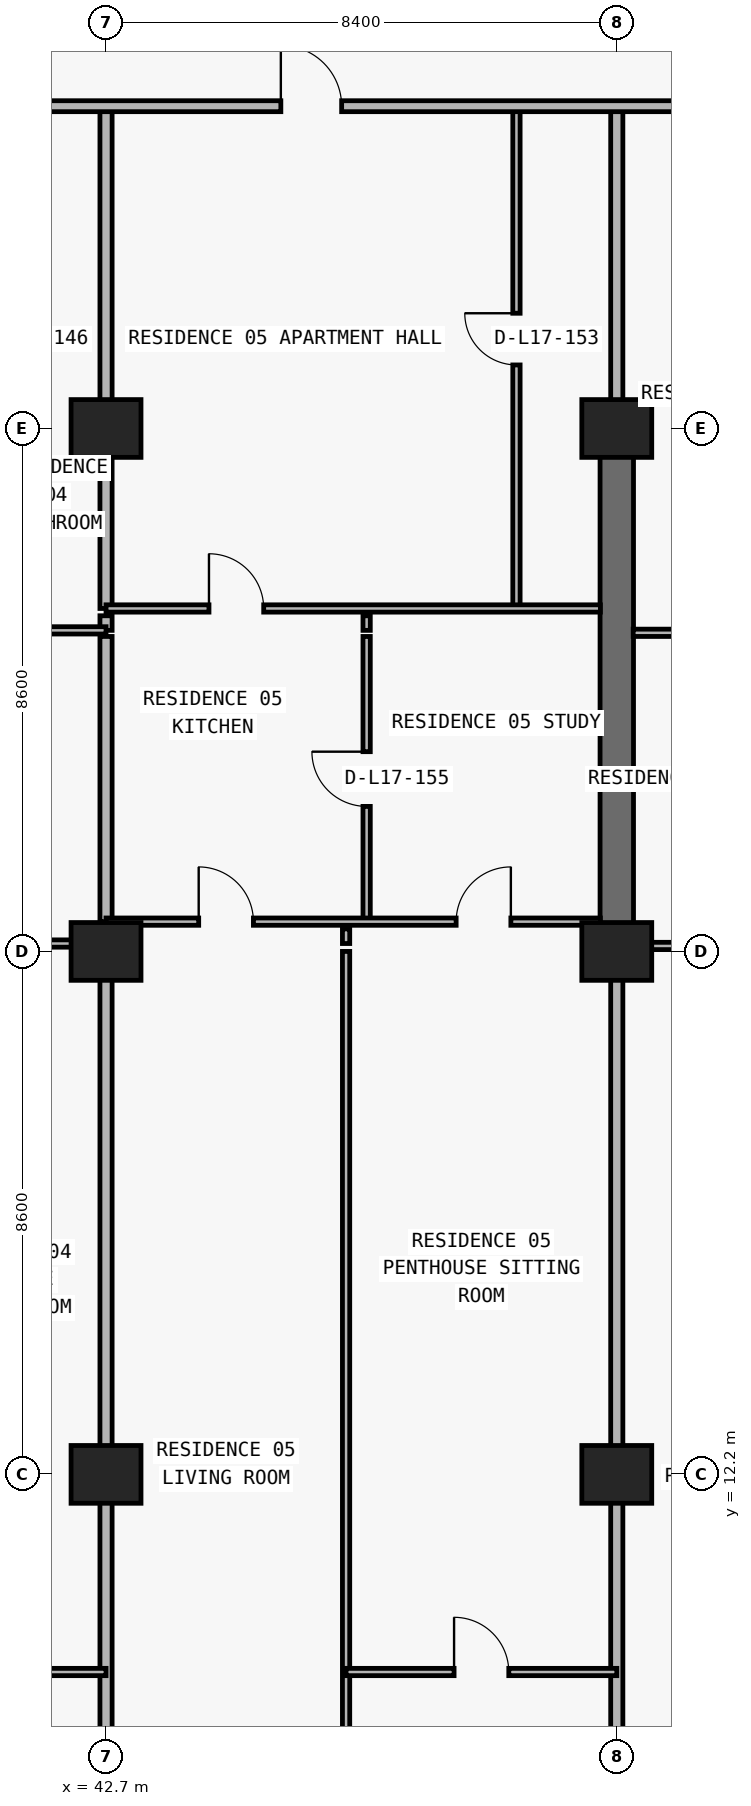
"""IFC4 building model, lengths in metres.
Left out: names, types, materials, properties, quantities, classifications, styles, units other than length and angle.
Written with IfcOpenShell. Run it as: python <this file> out.ifc"""

import sys

from ifc_helpers import new_model, si_unit, direction, frame, frame_2d, origin, origin_2d, place, context, subcontext, project, spatial, rectangle, extrude, element, fill, save


model = new_model("IFC4")
c1 = context("Model", 3, precision=1e-05, world=origin(), true_north=direction((0.0, 1.0)))
c2 = subcontext(c1, "Body", "Model", "MODEL_VIEW")
j1 = project(units=[si_unit("LENGTHUNIT", "METRE"), si_unit("PLANEANGLEUNIT", "RADIAN")], contexts=[c1])
p1 = place(None, origin())
s1 = spatial("IfcSite", under=j1, at=p1, CompositionType="ELEMENT")
p2 = place(p1, origin())
s2 = spatial("IfcBuilding", under=s1, at=p2, CompositionType="ELEMENT")
p3 = place(p2, frame((0.0, 0.0, 66.3)))
s3 = spatial("IfcBuildingStorey", under=s2, at=p3, CompositionType="ELEMENT", Elevation=66.3)
for number, where, z_axis, x_axis in (
    (1, (42.7, 12.2, 0.0), (0.0, 0.0, 1.0), (1.0, 0.0, 0.0)),
    (2, (51.1, 12.2, 0.0), (0.0, 0.0, 1.0), (1.0, 0.0, 0.0)),
    (3, (42.7, 20.8, 0.0), (0.0, 0.0, 1.0), (1.0, 0.0, 0.0)),
    (4, (51.1, 20.8, 0.0), (0.0, 0.0, 1.0), (1.0, 0.0, 0.0)),
    (5, (42.7, 29.4, 0.0), (0.0, 0.0, 1.0), (1.0, 0.0, 0.0)),
    (6, (51.1, 29.4, 0.0), (0.0, 0.0, 1.0), (1.0, 0.0, 0.0)),
):
    element("IfcColumn", number, at=place(p3, frame(where, z_axis=z_axis, x_axis=x_axis)), inside=s3, PredefinedType="COLUMN", context=c2, shape_type="SweptSolid", body=[
        extrude(rectangle(XDim=1.15, YDim=0.95, at=origin_2d()), origin(), (0.0, 0.0, 1.0), 3.05),
    ])
p4 = place(p3, frame((51.1, 20.8, 0.0), z_axis=(0.0, 0.0, 1.0), x_axis=(0.0, 1.0, 0.0)))
e7 = element("IfcWall", 7, at=p4, inside=s3, PredefinedType="SHEAR", context=c2, shape_type="SweptSolid", body=[
    extrude(rectangle(XDim=8.6, YDim=0.55, at=frame_2d((4.3, 0.0))), origin(), (0.0, 0.0, 1.0), 3.05),
])
p5 = place(p3, frame((42.7, 6.24, 0.0), z_axis=(0.0, 0.0, 1.0), x_axis=(0.0, 1.0, 0.0)))
e8 = element("IfcWall", 8, at=p5, inside=s3, PredefinedType="PARTITIONING", context=c2, shape_type="SweptSolid", body=[
    extrude(rectangle(XDim=14.56, YDim=0.2, at=frame_2d((7.28, 0.0))), origin(), (0.0, 0.0, 1.0), 2.11),
])
p6 = place(p3, frame((42.7, 20.93, 0.0), z_axis=(0.0, 0.0, 1.0), x_axis=(0.0, 1.0, 0.0)))
e9 = element("IfcWall", 9, at=p6, inside=s3, PredefinedType="PARTITIONING", context=c2, shape_type="SweptSolid", body=[
    extrude(rectangle(XDim=0.24, YDim=0.2, at=frame_2d((0.12, 0.0))), origin(), (0.0, 0.0, 1.0), 3.05),
])
p7 = place(p3, frame((42.7, 21.29, 0.0), z_axis=(0.0, 0.0, 1.0), x_axis=(0.0, 1.0, 0.0)))
e10 = element("IfcWall", 10, at=p7, inside=s3, PredefinedType="PARTITIONING", context=c2, shape_type="SweptSolid", body=[
    extrude(rectangle(XDim=4.69, YDim=0.2, at=frame_2d((2.345, 0.0))), origin(), (0.0, 0.0, 1.0), 2.11),
])
p8 = place(p3, frame((42.7, 26.08, 0.0), z_axis=(0.0, 0.0, 1.0), x_axis=(0.0, 1.0, 0.0)))
e11 = element("IfcWall", 11, at=p8, inside=s3, PredefinedType="PARTITIONING", context=c2, shape_type="SweptSolid", body=[
    extrude(rectangle(XDim=0.24, YDim=0.2, at=frame_2d((0.12, 0.0))), origin(), (0.0, 0.0, 1.0), 2.11),
])
p9 = place(p3, frame((42.7, 26.44, 0.0), z_axis=(0.0, 0.0, 1.0), x_axis=(0.0, 1.0, 0.0)))
e12 = element("IfcWall", 12, at=p9, inside=s3, PredefinedType="PARTITIONING", context=c2, shape_type="SweptSolid", body=[
    extrude(rectangle(XDim=8.26, YDim=0.2, at=frame_2d((4.13, 0.0))), origin(), (0.0, 0.0, 1.0), 2.11),
])
p10 = place(p3, frame((46.648, 6.24, 0.0), z_axis=(0.0, 0.0, 1.0), x_axis=(0.0, 1.0, 0.0)))
e13 = element("IfcWall", 13, at=p10, inside=s3, PredefinedType="PARTITIONING", context=c2, shape_type="SweptSolid", body=[
    extrude(rectangle(XDim=14.56, YDim=0.12, at=frame_2d((7.28, 0.0))), origin(), (0.0, 0.0, 1.0), 2.423),
])
p11 = place(p3, frame((46.648, 20.93, 0.0), z_axis=(0.0, 0.0, 1.0), x_axis=(0.0, 1.0, 0.0)))
e14 = element("IfcWall", 14, at=p11, inside=s3, PredefinedType="PARTITIONING", context=c2, shape_type="SweptSolid", body=[
    extrude(rectangle(XDim=0.24, YDim=0.12, at=frame_2d((0.12, 0.0))), origin(), (0.0, 0.0, 1.0), 2.423),
])
p12 = place(p3, frame((46.986, 21.29, 0.0), z_axis=(0.0, 0.0, 1.0), x_axis=(0.0, 1.0, 0.0)))
e15 = element("IfcWall", 15, at=p12, inside=s3, PredefinedType="PARTITIONING", context=c2, shape_type="SweptSolid", body=[
    extrude(rectangle(XDim=4.69, YDim=0.12, at=frame_2d((2.345, 0.0))), origin(), (0.0, 0.0, 1.0), 2.423),
])
p13 = place(p12, frame((1.895, 0.0, 0.0)))
e16 = element("IfcOpeningElement", 16, at=p13, cuts=e15, PredefinedType="OPENING", context=c2, shape_type="SweptSolid", body=[
    extrude(rectangle(XDim=0.9, YDim=2.15, at=frame_2d((0.45, 1.075))), frame((0.0, 0.07, 0.0), z_axis=(0.0, -1.0, 0.0), x_axis=(1.0, 0.0, 0.0)), (0.0, 0.0, 1.0), 0.14),
])
p14 = place(p3, frame((46.986, 26.08, 0.0), z_axis=(0.0, 0.0, 1.0), x_axis=(0.0, 1.0, 0.0)))
e17 = element("IfcWall", 17, at=p14, inside=s3, PredefinedType="PARTITIONING", context=c2, shape_type="SweptSolid", body=[
    extrude(rectangle(XDim=0.24, YDim=0.12, at=frame_2d((0.12, 0.0))), origin(), (0.0, 0.0, 1.0), 2.423),
])
p15 = place(p3, frame((49.45, 26.44, 0.0), z_axis=(0.0, 0.0, 1.0), x_axis=(0.0, 1.0, 0.0)))
e18 = element("IfcWall", 18, at=p15, inside=s3, PredefinedType="PARTITIONING", context=c2, shape_type="SweptSolid", body=[
    extrude(rectangle(XDim=8.26, YDim=0.12, at=frame_2d((4.13, 0.0))), origin(), (0.0, 0.0, 1.0), 3.05),
])
p16 = place(p15, frame((4.005, 0.0, 0.0)))
e19 = element("IfcOpeningElement", 19, at=p16, cuts=e18, PredefinedType="OPENING", context=c2, shape_type="SweptSolid", body=[
    extrude(rectangle(XDim=0.85, YDim=2.1, at=frame_2d((0.425, 1.05))), frame((0.0, 0.07, 0.0), z_axis=(0.0, -1.0, 0.0), x_axis=(1.0, 0.0, 0.0)), (0.0, 0.0, 1.0), 0.14),
])
p17 = place(p3, frame((51.1, 6.24, 0.0), z_axis=(0.0, 0.0, 1.0), x_axis=(0.0, 1.0, 0.0)))
e20 = element("IfcWall", 20, at=p17, inside=s3, PredefinedType="PARTITIONING", context=c2, shape_type="SweptSolid", body=[
    extrude(rectangle(XDim=14.555, YDim=0.2, at=frame_2d((7.277, 0.0))), origin(), (0.0, 0.0, 1.0), 2.11),
])
p18 = place(p3, frame((51.1, 29.405, 0.0), z_axis=(0.0, 0.0, 1.0), x_axis=(0.0, 1.0, 0.0)))
e21 = element("IfcWall", 21, at=p18, inside=s3, PredefinedType="PARTITIONING", context=c2, shape_type="SweptSolid", body=[
    extrude(rectangle(XDim=5.295, YDim=0.2, at=frame_2d((2.647, 0.0))), origin(), (0.0, 0.0, 1.0), 2.335),
])
p19 = place(p3, frame((39.28, 8.95, 0.0), z_axis=(0.0, 0.0, 1.0), x_axis=(1.0, 0.0, 0.0)))
e22 = element("IfcWall", 22, at=p19, inside=s3, PredefinedType="PARTITIONING", context=c2, shape_type="SweptSolid", body=[
    extrude(rectangle(XDim=3.42, YDim=0.12, at=frame_2d((1.71, 0.0))), origin(), (0.0, 0.0, 1.0), 3.05),
])
p20 = place(p19, frame((1.26, 0.0, 0.0)))
e23 = element("IfcOpeningElement", 23, at=p20, cuts=e22, PredefinedType="OPENING", context=c2, shape_type="SweptSolid", body=[
    extrude(rectangle(XDim=0.9, YDim=2.15, at=frame_2d((0.45, 1.075))), frame((0.0, 0.07, 0.0), z_axis=(0.0, -1.0, 0.0), x_axis=(1.0, 0.0, 0.0)), (0.0, 0.0, 1.0), 0.14),
])
p21 = place(p3, frame((46.648, 8.95, 0.0), z_axis=(0.0, 0.0, 1.0), x_axis=(1.0, 0.0, 0.0)))
e24 = element("IfcWall", 24, at=p21, inside=s3, PredefinedType="PARTITIONING", context=c2, shape_type="SweptSolid", body=[
    extrude(rectangle(XDim=4.452, YDim=0.12, at=frame_2d((2.226, 0.0))), origin(), (0.0, 0.0, 1.0), 3.05),
])
p22 = place(p21, frame((1.776, 0.0, 0.0)))
e25 = element("IfcOpeningElement", 25, at=p22, cuts=e24, PredefinedType="OPENING", context=c2, shape_type="SweptSolid", body=[
    extrude(rectangle(XDim=0.9, YDim=2.15, at=frame_2d((0.45, 1.075))), frame((0.0, 0.07, 0.0), z_axis=(0.0, -1.0, 0.0), x_axis=(1.0, 0.0, 0.0)), (0.0, 0.0, 1.0), 0.14),
])
p23 = place(p3, frame((51.37, 20.89, 0.0), z_axis=(0.0, 0.0, 1.0), x_axis=(1.0, 0.0, 0.0)))
e26 = element("IfcWall", 26, at=p23, inside=s3, PredefinedType="PARTITIONING", context=c2, shape_type="SweptSolid", body=[
    extrude(rectangle(XDim=8.13, YDim=0.12, at=frame_2d((4.065, 0.0))), origin(), (0.0, 0.0, 1.0), 2.11),
])
p24 = place(p23, frame((1.683, 0.0, 0.0)))
e27 = element("IfcOpeningElement", 27, at=p24, cuts=e26, PredefinedType="OPENING", context=c2, shape_type="SweptSolid", body=[
    extrude(rectangle(XDim=0.9, YDim=2.06, at=frame_2d((0.45, 1.03))), frame((0.0, 0.07, 0.0), z_axis=(0.0, -1.0, 0.0), x_axis=(1.0, 0.0, 0.0)), (0.0, 0.0, 1.0), 0.14),
])
p25 = place(p23, frame((5.79, 0.0, 0.0)))
e28 = element("IfcOpeningElement", 28, at=p25, cuts=e26, PredefinedType="OPENING", context=c2, shape_type="SweptSolid", body=[
    extrude(rectangle(XDim=0.9, YDim=2.06, at=frame_2d((0.45, 1.03))), frame((0.0, 0.07, 0.0), z_axis=(0.0, -1.0, 0.0), x_axis=(1.0, 0.0, 0.0)), (0.0, 0.0, 1.0), 0.14),
])
p26 = place(p3, frame((35.1, 20.93, 0.0), z_axis=(0.0, 0.0, 1.0), x_axis=(1.0, 0.0, 0.0)))
e29 = element("IfcWall", 29, at=p26, inside=s3, PredefinedType="PARTITIONING", context=c2, shape_type="SweptSolid", body=[
    extrude(rectangle(XDim=7.6, YDim=0.12, at=frame_2d((3.8, 0.0))), origin(), (0.0, 0.0, 1.0), 2.11),
])
p27 = place(p26, frame((1.64, 0.0, 0.0)))
e30 = element("IfcOpeningElement", 30, at=p27, cuts=e29, PredefinedType="OPENING", context=c2, shape_type="SweptSolid", body=[
    extrude(rectangle(XDim=0.9, YDim=2.06, at=frame_2d((0.45, 1.03))), frame((0.0, 0.07, 0.0), z_axis=(0.0, -1.0, 0.0), x_axis=(1.0, 0.0, 0.0)), (0.0, 0.0, 1.0), 0.14),
])
p28 = place(p26, frame((5.527, 0.0, 0.0)))
e31 = element("IfcOpeningElement", 31, at=p28, cuts=e29, PredefinedType="OPENING", context=c2, shape_type="SweptSolid", body=[
    extrude(rectangle(XDim=0.9, YDim=2.06, at=frame_2d((0.45, 1.03))), frame((0.0, 0.07, 0.0), z_axis=(0.0, -1.0, 0.0), x_axis=(1.0, 0.0, 0.0)), (0.0, 0.0, 1.0), 0.14),
])
p29 = place(p3, frame((42.7, 21.29, 0.0), z_axis=(0.0, 0.0, 1.0), x_axis=(1.0, 0.0, 0.0)))
e32 = element("IfcWall", 32, at=p29, inside=s3, PredefinedType="PARTITIONING", context=c2, shape_type="SweptSolid", body=[
    extrude(rectangle(XDim=8.13, YDim=0.12, at=frame_2d((4.065, 0.0))), origin(), (0.0, 0.0, 1.0), 3.05),
])
p30 = place(p29, frame((1.524, 0.0, 0.0)))
e33 = element("IfcOpeningElement", 33, at=p30, cuts=e32, PredefinedType="OPENING", context=c2, shape_type="SweptSolid", body=[
    extrude(rectangle(XDim=0.9, YDim=2.15, at=frame_2d((0.45, 1.075))), frame((0.0, 0.07, 0.0), z_axis=(0.0, -1.0, 0.0), x_axis=(1.0, 0.0, 0.0)), (0.0, 0.0, 1.0), 0.14),
])
p31 = place(p29, frame((5.758, 0.0, 0.0)))
e34 = element("IfcOpeningElement", 34, at=p31, cuts=e32, PredefinedType="OPENING", context=c2, shape_type="SweptSolid", body=[
    extrude(rectangle(XDim=0.9, YDim=2.15, at=frame_2d((0.45, 1.075))), frame((0.0, 0.07, 0.0), z_axis=(0.0, -1.0, 0.0), x_axis=(1.0, 0.0, 0.0)), (0.0, 0.0, 1.0), 0.14),
])
p32 = place(p3, frame((51.37, 26.04, 0.0), z_axis=(0.0, 0.0, 1.0), x_axis=(1.0, 0.0, 0.0)))
e35 = element("IfcWall", 35, at=p32, inside=s3, PredefinedType="PARTITIONING", context=c2, shape_type="SweptSolid", body=[
    extrude(rectangle(XDim=8.13, YDim=0.12, at=frame_2d((4.065, 0.0))), origin(), (0.0, 0.0, 1.0), 3.05),
])
p33 = place(p32, frame((1.683, 0.0, 0.0)))
e36 = element("IfcOpeningElement", 36, at=p33, cuts=e35, PredefinedType="OPENING", context=c2, shape_type="SweptSolid", body=[
    extrude(rectangle(XDim=0.9, YDim=2.15, at=frame_2d((0.45, 1.075))), frame((0.0, 0.07, 0.0), z_axis=(0.0, -1.0, 0.0), x_axis=(1.0, 0.0, 0.0)), (0.0, 0.0, 1.0), 0.14),
])
p34 = place(p3, frame((35.1, 26.08, 0.0), z_axis=(0.0, 0.0, 1.0), x_axis=(1.0, 0.0, 0.0)))
e37 = element("IfcWall", 37, at=p34, inside=s3, PredefinedType="PARTITIONING", context=c2, shape_type="SweptSolid", body=[
    extrude(rectangle(XDim=7.6, YDim=0.12, at=frame_2d((3.8, 0.0))), origin(), (0.0, 0.0, 1.0), 3.05),
])
p35 = place(p34, frame((1.727, 0.0, 0.0)))
e38 = element("IfcOpeningElement", 38, at=p35, cuts=e37, PredefinedType="OPENING", context=c2, shape_type="SweptSolid", body=[
    extrude(rectangle(XDim=0.9, YDim=2.15, at=frame_2d((0.45, 1.075))), frame((0.0, 0.07, 0.0), z_axis=(0.0, -1.0, 0.0), x_axis=(1.0, 0.0, 0.0)), (0.0, 0.0, 1.0), 0.14),
])
p36 = place(p3, frame((42.7, 26.44, 0.0), z_axis=(0.0, 0.0, 1.0), x_axis=(1.0, 0.0, 0.0)))
e39 = element("IfcWall", 39, at=p36, inside=s3, PredefinedType="PARTITIONING", context=c2, shape_type="SweptSolid", body=[
    extrude(rectangle(XDim=8.13, YDim=0.12, at=frame_2d((4.065, 0.0))), origin(), (0.0, 0.0, 1.0), 3.05),
])
p37 = place(p36, frame((1.693, 0.0, 0.0)))
e40 = element("IfcOpeningElement", 40, at=p37, cuts=e39, PredefinedType="OPENING", context=c2, shape_type="SweptSolid", body=[
    extrude(rectangle(XDim=0.9, YDim=2.15, at=frame_2d((0.45, 1.075))), frame((0.0, 0.07, 0.0), z_axis=(0.0, -1.0, 0.0), x_axis=(1.0, 0.0, 0.0)), (0.0, 0.0, 1.0), 0.14),
])
p38 = place(p3, frame((26.7, 34.7, 0.0), z_axis=(0.0, 0.0, 1.0), x_axis=(1.0, 0.0, 0.0)))
e41 = element("IfcWall", 41, at=p38, inside=s3, PredefinedType="PARTITIONING", context=c2, shape_type="SweptSolid", body=[
    extrude(rectangle(XDim=46.0, YDim=0.18, at=frame_2d((23.0, 0.0))), origin(), (0.0, 0.0, 1.0), 3.05),
])
p39 = place(p38, frame((2.875, 0.0, 0.0)))
e42 = element("IfcOpeningElement", 42, at=p39, cuts=e41, PredefinedType="OPENING", context=c2, shape_type="SweptSolid", body=[
    extrude(rectangle(XDim=1.0, YDim=2.2, at=frame_2d((0.5, 1.1))), frame((0.0, 0.1, 0.0), z_axis=(0.0, -1.0, 0.0), x_axis=(1.0, 0.0, 0.0)), (0.0, 0.0, 1.0), 0.2),
])
p40 = place(p38, frame((10.875, 0.0, 0.0)))
e43 = element("IfcOpeningElement", 43, at=p40, cuts=e41, PredefinedType="OPENING", context=c2, shape_type="SweptSolid", body=[
    extrude(rectangle(XDim=1.0, YDim=2.2, at=frame_2d((0.5, 1.1))), frame((0.0, 0.1, 0.0), z_axis=(0.0, -1.0, 0.0), x_axis=(1.0, 0.0, 0.0)), (0.0, 0.0, 1.0), 0.2),
])
p41 = place(p38, frame((18.875, 0.0, 0.0)))
e44 = element("IfcOpeningElement", 44, at=p41, cuts=e41, PredefinedType="OPENING", context=c2, shape_type="SweptSolid", body=[
    extrude(rectangle(XDim=1.0, YDim=2.2, at=frame_2d((0.5, 1.1))), frame((0.0, 0.1, 0.0), z_axis=(0.0, -1.0, 0.0), x_axis=(1.0, 0.0, 0.0)), (0.0, 0.0, 1.0), 0.2),
])
p42 = place(p38, frame((27.275, 0.0, 0.0)))
e45 = element("IfcOpeningElement", 45, at=p42, cuts=e41, PredefinedType="OPENING", context=c2, shape_type="SweptSolid", body=[
    extrude(rectangle(XDim=1.0, YDim=2.2, at=frame_2d((0.5, 1.1))), frame((0.0, 0.1, 0.0), z_axis=(0.0, -1.0, 0.0), x_axis=(1.0, 0.0, 0.0)), (0.0, 0.0, 1.0), 0.2),
])
p43 = place(p38, frame((35.675, 0.0, 0.0)))
e46 = element("IfcOpeningElement", 46, at=p43, cuts=e41, PredefinedType="OPENING", context=c2, shape_type="SweptSolid", body=[
    extrude(rectangle(XDim=1.0, YDim=2.2, at=frame_2d((0.5, 1.1))), frame((0.0, 0.1, 0.0), z_axis=(0.0, -1.0, 0.0), x_axis=(1.0, 0.0, 0.0)), (0.0, 0.0, 1.0), 0.2),
])
p44 = place(p41, origin())
e47 = element("IfcDoor", 47, at=p44, inside=s3, OperationType="SINGLE_SWING_LEFT", PredefinedType="DOOR", context=c2, shape_type="SweptSolid", body=[
    extrude(rectangle(XDim=1.0, YDim=2.2, at=frame_2d((0.5, 1.1))), frame((0.0, 0.025, 0.0), z_axis=(0.0, -1.0, 0.0), x_axis=(1.0, 0.0, 0.0)), (0.0, 0.0, 1.0), 0.05),
])
fill(e44, e47)
p45 = place(p16, origin())
e48 = element("IfcDoor", 48, at=p45, inside=s3, OperationType="SINGLE_SWING_RIGHT", PredefinedType="DOOR", context=c2, shape_type="SweptSolid", body=[
    extrude(rectangle(XDim=0.85, YDim=2.1, at=frame_2d((0.425, 1.05))), frame((0.0, 0.025, 0.0), z_axis=(0.0, -1.0, 0.0), x_axis=(1.0, 0.0, 0.0)), (0.0, 0.0, 1.0), 0.05),
])
fill(e19, e48)
p46 = place(p37, origin())
e49 = element("IfcDoor", 49, at=p46, inside=s3, OperationType="SINGLE_SWING_LEFT", PredefinedType="DOOR", context=c2, shape_type="SweptSolid", body=[
    extrude(rectangle(XDim=0.9, YDim=2.15, at=frame_2d((0.45, 1.075))), frame((0.0, 0.025, 0.0), z_axis=(0.0, -1.0, 0.0), x_axis=(1.0, 0.0, 0.0)), (0.0, 0.0, 1.0), 0.05),
])
fill(e40, e49)
p47 = place(p13, origin())
e50 = element("IfcDoor", 50, at=p47, inside=s3, OperationType="SINGLE_SWING_RIGHT", PredefinedType="DOOR", context=c2, shape_type="SweptSolid", body=[
    extrude(rectangle(XDim=0.9, YDim=2.15, at=frame_2d((0.45, 1.075))), frame((0.0, 0.025, 0.0), z_axis=(0.0, -1.0, 0.0), x_axis=(1.0, 0.0, 0.0)), (0.0, 0.0, 1.0), 0.05),
])
fill(e16, e50)
p48 = place(p30, origin())
e51 = element("IfcDoor", 51, at=p48, inside=s3, OperationType="SINGLE_SWING_LEFT", PredefinedType="DOOR", context=c2, shape_type="SweptSolid", body=[
    extrude(rectangle(XDim=0.9, YDim=2.15, at=frame_2d((0.45, 1.075))), frame((0.0, 0.025, 0.0), z_axis=(0.0, -1.0, 0.0), x_axis=(1.0, 0.0, 0.0)), (0.0, 0.0, 1.0), 0.05),
])
fill(e33, e51)
p49 = place(p31, origin())
e52 = element("IfcDoor", 52, at=p49, inside=s3, OperationType="SINGLE_SWING_RIGHT", PredefinedType="DOOR", context=c2, shape_type="SweptSolid", body=[
    extrude(rectangle(XDim=0.9, YDim=2.15, at=frame_2d((0.45, 1.075))), frame((0.0, 0.025, 0.0), z_axis=(0.0, -1.0, 0.0), x_axis=(1.0, 0.0, 0.0)), (0.0, 0.0, 1.0), 0.05),
])
fill(e34, e52)
p50 = place(p22, origin())
e53 = element("IfcDoor", 53, at=p50, inside=s3, OperationType="SINGLE_SWING_LEFT", PredefinedType="DOOR", context=c2, shape_type="SweptSolid", body=[
    extrude(rectangle(XDim=0.9, YDim=2.15, at=frame_2d((0.45, 1.075))), frame((0.0, 0.025, 0.0), z_axis=(0.0, -1.0, 0.0), x_axis=(1.0, 0.0, 0.0)), (0.0, 0.0, 1.0), 0.05),
])
fill(e25, e53)
save(model, sys.argv[1])
